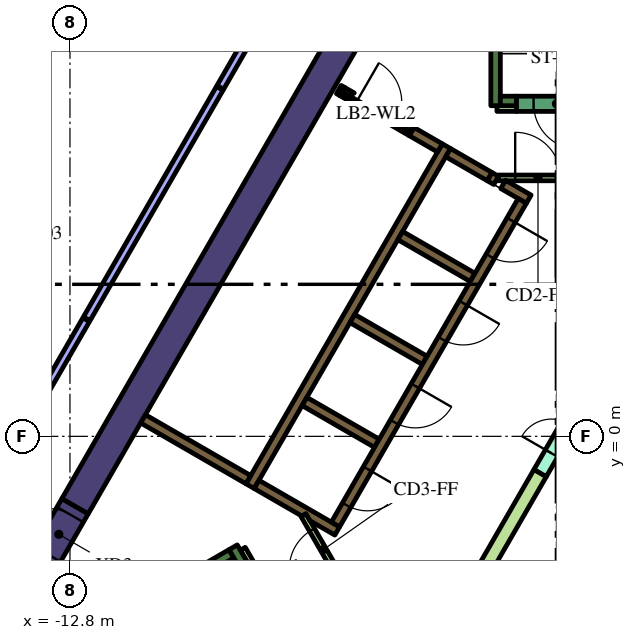
"""IFC4 building model, lengths in metres.
Left out: names, types, materials, properties, quantities, classifications, styles, units other than length and angle.
Written with IfcOpenShell. Run it as: python <this file> out.ifc"""

import sys

from ifc_helpers import new_model, si_unit, direction, frame, frame_2d, origin, place, context, subcontext, project, spatial, polyline, rectangle, outline, extrude, element, fill, save


model = new_model("IFC4")
c1 = context("Model", 3, precision=1e-05, world=origin(), true_north=direction((0.0, 1.0)))
c2 = subcontext(c1, "Body", "Model", "MODEL_VIEW")
j1 = project(units=[si_unit("LENGTHUNIT", "METRE"), si_unit("PLANEANGLEUNIT", "RADIAN")], contexts=[c1])
p1 = place(None, origin())
s1 = spatial("IfcSite", under=j1, at=p1, CompositionType="ELEMENT")
p2 = place(p1, origin())
s2 = spatial("IfcBuilding", under=s1, at=p2, CompositionType="ELEMENT")
p3 = place(p2, frame((0.0, 0.0, 183.6)))
s3 = spatial("IfcBuildingStorey", under=s2, at=p3, CompositionType="ELEMENT", Elevation=183.6)
p4 = place(p3, frame((-13.518, -3.314, 0.0), z_axis=(0.0, 0.0, 1.0), x_axis=(-0.499969377405, -0.866043083026, 0.0)))
e1 = element("IfcWall", 1, at=p4, inside=s3, PredefinedType="SOLIDWALL", context=c2, shape_type="SweptSolid", body=[
    extrude(rectangle(XDim=2.824, YDim=0.8, at=frame_2d((1.412, 0.0))), origin(), (0.0, 0.0, 1.0), 4.2),
])
p5 = place(p3, frame((-12.668, -1.842, 0.0), z_axis=(0.0, 0.0, 1.0), x_axis=(0.500003640647, 0.866023301845, 0.0)))
e2 = element("IfcWall", 2, at=p5, inside=s3, PredefinedType="SOLIDWALL", context=c2, shape_type="SweptSolid", body=[
    extrude(rectangle(XDim=15.858, YDim=0.8, at=frame_2d((7.929, 0.0))), origin(), (0.0, 0.0, 1.0), 4.2),
])
p6 = place(p3, frame((-1.6, 8.7, 0.0), z_axis=(0.0, 0.0, 1.0), x_axis=(0.0, 1.0, 0.0)))
e3 = element("IfcWall", 3, at=p6, inside=s3, PredefinedType="SOLIDWALL", context=c2, shape_type="SweptSolid", body=[
    extrude(rectangle(XDim=7.05, YDim=0.25, at=frame_2d((3.525, 0.0))), origin(), (0.0, 0.0, 1.0), 4.2),
])
p7 = place(p3, frame((-1.475, 8.825, 0.0), z_axis=(0.0, 0.0, 1.0), x_axis=(1.0, 0.0, 0.0)))
e4 = element("IfcWall", 4, at=p7, inside=s3, PredefinedType="SOLIDWALL", context=c2, shape_type="SweptSolid", body=[
    extrude(rectangle(XDim=0.425, YDim=0.25, at=frame_2d((0.212, 0.0))), origin(), (0.0, 0.0, 1.0), 4.2),
])
p8 = place(p3, frame((-14.44, -6.49, 0.0), z_axis=(0.0, 0.0, 1.0), x_axis=(0.866022966069, 0.500004222222, 0.0)))
e5 = element("IfcWall", 5, at=p8, inside=s3, PredefinedType="SOLIDWALL", context=c2, shape_type="SweptSolid", body=[
    extrude(rectangle(XDim=6.8, YDim=0.25, at=frame_2d((3.4, 0.0))), origin(), (0.0, 0.0, 1.0), 4.2),
])
p9 = place(p3, frame((-8.168, -3.503, 0.0), z_axis=(0.0, 0.0, 1.0), x_axis=(-0.499952099219, 0.866053057547, 0.0)))
e6 = element("IfcWall", 6, at=p9, inside=s3, PredefinedType="SOLIDWALL", context=c2, shape_type="SweptSolid", body=[
    extrude(rectangle(XDim=0.675, YDim=0.25, at=frame_2d((0.337, 0.0))), origin(), (0.0, 0.0, 1.0), 4.2),
])
p10 = place(p3, frame((-8.06, -1.311, 0.0), z_axis=(0.0, 0.0, 1.0), x_axis=(0.50000273126, 0.866023826885, 0.0)))
e7 = element("IfcWall", 7, at=p10, inside=s3, PredefinedType="SOLIDWALL", context=c2, shape_type="SweptSolid", body=[
    extrude(rectangle(XDim=10.33, YDim=0.25, at=frame_2d((5.165, 0.0))), origin(), (0.0, 0.0, 1.0), 4.2),
])
p11 = place(p3, frame((-1.758, 6.835, 0.0), z_axis=(0.0, 0.0, 1.0), x_axis=(0.865982457891, -0.500074377092, 0.0)))
e8 = element("IfcWall", 8, at=p11, inside=s3, PredefinedType="SOLIDWALL", context=c2, shape_type="SweptSolid", body=[
    extrude(rectangle(XDim=0.2, YDim=0.25, at=frame_2d((0.1, 0.0))), origin(), (0.0, 0.0, 1.0), 4.2),
])
p12 = place(p3, frame((-1.76, 6.836, 0.0), z_axis=(0.0, 0.0, 1.0), x_axis=(-0.865952863304, 0.500125622755, 0.0)))
e9 = element("IfcWall", 9, at=p12, inside=s3, PredefinedType="SOLIDWALL", context=c2, shape_type="SweptSolid", body=[
    extrude(rectangle(XDim=1.258, YDim=0.25, at=frame_2d((0.629, 0.0))), origin(), (0.0, 0.0, 1.0), 4.2),
])
p13 = place(p3, frame((-0.728, 6.24, 0.0), z_axis=(0.0, 0.0, 1.0), x_axis=(-0.865955664968, 0.500120771724, 0.0)))
e10 = element("IfcWall", 10, at=p13, inside=s3, PredefinedType="SOLIDWALL", context=c2, shape_type="SweptSolid", body=[
    extrude(rectangle(XDim=0.778, YDim=0.25, at=frame_2d((0.389, 0.0))), origin(), (0.0, 0.0, 1.0), 4.2),
])
for number, where, z_axis, x_axis in (
    (11, (-2.204, 4.182, 0.0), (0.0, 0.0, 1.0), (-0.866, 0.5, 0.0)),
    (12, (-5.369, 3.1, 0.0), (0.0, 0.0, 1.0), (0.866, -0.5, 0.0)),
    (13, (-4.724, -0.182, 0.0), (0.0, 0.0, 1.0), (-0.866, 0.5, 0.0)),
):
    element("IfcWall", number, at=place(p3, frame(where, z_axis=z_axis, x_axis=x_axis)), inside=s3, PredefinedType="SOLIDWALL", context=c2, shape_type="SweptSolid", body=[
        extrude(rectangle(XDim=2.2, YDim=0.25, at=frame_2d((1.1, 0.0))), origin(), (0.0, 0.0, 1.0), 4.2),
    ])
p14 = place(p3, origin())
e14 = element("IfcWall", 14, at=p14, inside=s3, PredefinedType="SOLIDWALL", context=c2, shape_type="SweptSolid", body=[
    extrude(outline(polyline([(-5.922, -2.257), (-5.922, -2.257), (-5.705, -2.382), (-5.83, -2.598), (-6.483, -2.221), (-6.591, -2.033), (-6.591, -2.033), (-6.7, -2.096), (-7.952, -1.373), (-7.827, -1.156), (-5.922, -2.257)])), origin(), (0.0, 0.0, 1.0), 4.2),
])
p15 = place(p3, frame((-8.106, -1.14, 0.0), z_axis=(0.0, 0.0, 1.0), x_axis=(-0.866008981251, 0.500028443584, 0.0)))
e15 = element("IfcWall", 15, at=p15, inside=s3, PredefinedType="SOLIDWALL", context=c2, shape_type="SweptSolid", body=[
    extrude(rectangle(XDim=3.2, YDim=0.25, at=frame_2d((1.6, 0.0))), origin(), (0.0, 0.0, 1.0), 4.2),
])
p16 = place(p3, frame((-5.725, 9.125, 0.0), z_axis=(0.0, 0.0, 1.0), x_axis=(0.866185586049, -0.49972245349, 0.0)))
e16 = element("IfcWall", 16, at=p16, inside=s3, PredefinedType="SOLIDWALL", context=c2, shape_type="SweptSolid", body=[
    extrude(rectangle(XDim=0.11, YDim=0.25, at=frame_2d((0.055, 0.0))), origin(), (0.0, 0.0, 1.0), 4.2),
])
p17 = place(p3, frame((-3.066, 7.59, 0.0), z_axis=(0.0, 0.0, 1.0), x_axis=(-0.866081358704, 0.49990307071, 0.0)))
e17 = element("IfcWall", 17, at=p17, inside=s3, PredefinedType="SOLIDWALL", context=c2, shape_type="SweptSolid", body=[
    extrude(rectangle(XDim=0.858, YDim=0.25, at=frame_2d((0.429, 0.0))), origin(), (0.0, 0.0, 1.0), 4.2),
])
e18 = element("IfcWall", 18, at=p14, inside=s3, PredefinedType="SOLIDWALL", context=c2, shape_type="SweptSolid", body=[
    extrude(outline(polyline([(-3.748, 8.128), (-3.813, 8.015), (-4.027, 8.139), (-4.017, 8.156), (-4.008, 8.173), (-4.0, 8.192), (-3.995, 8.21), (-3.991, 8.23), (-3.99, 8.25), (-3.99, 8.268), (-3.748, 8.128)])), origin(), (0.0, 0.0, 1.0), 4.2),
])
e19 = element("IfcWall", 19, at=p14, inside=s3, PredefinedType="SOLIDWALL", context=c2, shape_type="SweptSolid", body=[
    extrude(outline(polyline([(-5.689, 8.96), (-5.69, 8.961), (-5.565, 9.177), (-5.319, 9.035), (-5.335, 9.026), (-5.351, 9.015), (-5.366, 9.002), (-5.379, 8.988), (-5.392, 8.972), (-5.402, 8.956), (-5.412, 8.939), (-5.629, 9.064), (-5.629, 9.064), (-5.689, 8.96)])), origin(), (0.0, 0.0, 1.0), 4.2),
])
for number, where, z_axis, x_axis in (
    (20, (-8.252, -2.958, 0.0), (0.0, 0.0, 1.0), (0.5, -0.866, 0.0)),
    (21, (-1.564, 8.625, 0.0), (0.0, 0.0, 1.0), (1.0, 0.0, 0.0)),
):
    element("IfcWall", number, at=place(p3, frame(where, z_axis=z_axis, x_axis=x_axis)), inside=s3, PredefinedType="PARTITIONING", context=c2, shape_type="SweptSolid", body=[
        extrude(rectangle(XDim=0.514, YDim=0.15, at=frame_2d((0.257, 0.0))), origin(), (0.0, 0.0, 1.0), 3.15),
    ])
e22 = element("IfcWall", 22, at=p14, inside=s3, PredefinedType="PARTITIONING", context=c2, shape_type="SweptSolid", body=[
    extrude(outline(polyline([(-0.59, -0.872), (-0.265, -1.059), (-1.822, -3.756), (-2.147, -3.568), (-0.59, -0.872)])), origin(), (0.0, 0.0, 1.0), 3.15),
])
p18 = place(p3, frame((-0.898, 6.194, 0.0), z_axis=(0.0, 0.0, 1.0), x_axis=(-0.499996202215, -0.866027596426, 0.0)))
e23 = element("IfcWall", 23, at=p18, inside=s3, PredefinedType="SOLIDWALL", context=c2, shape_type="SweptSolid", body=[
    extrude(rectangle(XDim=9.83, YDim=0.25, at=frame_2d((4.915, 0.0))), origin(), (0.0, 0.0, 1.0), 4.2),
])
p19 = place(p18, frame((0.585, 0.0, 0.0)))
e24 = element("IfcOpeningElement", 24, at=p19, cuts=e23, PredefinedType="OPENING", context=c2, shape_type="SweptSolid", body=[
    extrude(rectangle(XDim=1.1, YDim=2.1, at=frame_2d((0.55, 1.05))), frame((0.0, 0.135, 0.0), z_axis=(0.0, -1.0, 0.0), x_axis=(1.0, 0.0, 0.0)), (0.0, 0.0, 1.0), 0.27),
])
p20 = place(p18, frame((3.105, 0.0, 0.0)))
e25 = element("IfcOpeningElement", 25, at=p20, cuts=e23, PredefinedType="OPENING", context=c2, shape_type="SweptSolid", body=[
    extrude(rectangle(XDim=1.1, YDim=2.1, at=frame_2d((0.55, 1.05))), frame((0.0, 0.135, 0.0), z_axis=(0.0, -1.0, 0.0), x_axis=(1.0, 0.0, 0.0)), (0.0, 0.0, 1.0), 0.27),
])
p21 = place(p18, frame((5.625, 0.0, 0.0)))
e26 = element("IfcOpeningElement", 26, at=p21, cuts=e23, PredefinedType="OPENING", context=c2, shape_type="SweptSolid", body=[
    extrude(rectangle(XDim=1.1, YDim=2.1, at=frame_2d((0.55, 1.05))), frame((0.0, 0.135, 0.0), z_axis=(0.0, -1.0, 0.0), x_axis=(1.0, 0.0, 0.0)), (0.0, 0.0, 1.0), 0.27),
])
p22 = place(p18, frame((8.145, 0.0, 0.0)))
e27 = element("IfcOpeningElement", 27, at=p22, cuts=e23, PredefinedType="OPENING", context=c2, shape_type="SweptSolid", body=[
    extrude(rectangle(XDim=1.1, YDim=2.1, at=frame_2d((0.55, 1.05))), frame((0.0, 0.135, 0.0), z_axis=(0.0, -1.0, 0.0), x_axis=(1.0, 0.0, 0.0)), (0.0, 0.0, 1.0), 0.27),
])
p23 = place(p3, frame((1.05, 8.75, 0.0), z_axis=(0.0, 0.0, 1.0), x_axis=(-1.0, 0.0, 0.0)))
e28 = element("IfcWall", 28, at=p23, inside=s3, PredefinedType="SOLIDWALL", context=c2, shape_type="SweptSolid", body=[
    extrude(rectangle(XDim=2.1, YDim=0.4, at=frame_2d((1.05, 0.0))), origin(), (0.0, 0.0, 1.0), 4.2),
])
p24 = place(p23, frame((0.45, 0.0, 0.0)))
e29 = element("IfcOpeningElement", 29, at=p24, cuts=e28, PredefinedType="OPENING", context=c2, shape_type="SweptSolid", body=[
    extrude(rectangle(XDim=1.2, YDim=2.1, at=frame_2d((0.6, 1.05))), frame((0.0, 0.21, 0.0), z_axis=(0.0, -1.0, 0.0), x_axis=(1.0, 0.0, 0.0)), (0.0, 0.0, 1.0), 0.42),
])
p25 = place(p3, frame((-0.427, -0.966, 0.0), z_axis=(0.0, 0.0, 1.0), x_axis=(0.49994051562, 0.866059744384, 0.0)))
e30 = element("IfcWall", 30, at=p25, inside=s3, PredefinedType="PARTITIONING", context=c2, shape_type="SweptSolid", body=[
    extrude(rectangle(XDim=2.1, YDim=0.375, at=frame_2d((1.05, 0.0))), origin(), (0.0, 0.0, 1.0), 3.15),
])
p26 = place(p25, frame((0.6, 0.0, 0.0)))
e31 = element("IfcOpeningElement", 31, at=p26, cuts=e30, PredefinedType="OPENING", context=c2, shape_type="SweptSolid", body=[
    extrude(rectangle(XDim=0.9, YDim=2.1, at=frame_2d((0.45, 1.05))), frame((0.0, 0.198, 0.0), z_axis=(0.0, -1.0, 0.0), x_axis=(1.0, 0.0, 0.0)), (0.0, 0.0, 1.0), 0.395),
])
p27 = place(p3, frame((-1.534, 6.8, 0.0), z_axis=(0.0, 0.0, 1.0), x_axis=(1.0, 0.0, 0.0)))
e32 = element("IfcWall", 32, at=p27, inside=s3, PredefinedType="PARTITIONING", context=c2, shape_type="SweptSolid", body=[
    extrude(rectangle(XDim=2.1, YDim=0.15, at=frame_2d((1.05, 0.0))), origin(), (0.0, 0.0, 1.0), 3.15),
])
p28 = place(p27, frame((0.45, 0.0, 0.0)))
e33 = element("IfcOpeningElement", 33, at=p28, cuts=e32, PredefinedType="OPENING", context=c2, shape_type="SweptSolid", body=[
    extrude(rectangle(XDim=1.2, YDim=2.1, at=frame_2d((0.6, 1.05))), frame((0.0, 0.085, 0.0), z_axis=(0.0, -1.0, 0.0), x_axis=(1.0, 0.0, 0.0)), (0.0, 0.0, 1.0), 0.17),
])
p29 = place(p3, frame((-5.606, -3.89, 0.0), z_axis=(0.0, 0.0, 1.0), x_axis=(-0.500027713859, 0.866009402589, 0.0)))
e34 = element("IfcWall", 34, at=p29, inside=s3, PredefinedType="PARTITIONING", context=c2, shape_type="SweptSolid", body=[
    extrude(rectangle(XDim=2.1, YDim=0.15, at=frame_2d((1.05, 0.0))), origin(), (0.0, 0.0, 1.0), 3.15),
])
p30 = place(p29, frame((0.45, 0.0, 0.0)))
e35 = element("IfcOpeningElement", 35, at=p30, cuts=e34, PredefinedType="OPENING", context=c2, shape_type="SweptSolid", body=[
    extrude(rectangle(XDim=1.2, YDim=2.1, at=frame_2d((0.6, 1.05))), frame((0.0, 0.085, 0.0), z_axis=(0.0, -1.0, 0.0), x_axis=(1.0, 0.0, 0.0)), (0.0, 0.0, 1.0), 0.17),
])
p31 = place(p3, frame((-5.659, 9.012, 0.0), z_axis=(0.0, 0.0, 1.0), x_axis=(0.866009402589, -0.500027713859, 0.0)))
e36 = element("IfcWall", 36, at=p31, inside=s3, PredefinedType="PARTITIONING", context=c2, shape_type="SweptSolid", body=[
    extrude(rectangle(XDim=2.1, YDim=0.12, at=frame_2d((1.05, 0.0))), origin(), (0.0, 0.0, 1.0), 3.15),
])
p32 = place(p31, frame((0.45, 0.0, 0.0)))
e37 = element("IfcOpeningElement", 37, at=p32, cuts=e36, PredefinedType="OPENING", context=c2, shape_type="SweptSolid", body=[
    extrude(rectangle(XDim=1.2, YDim=2.1, at=frame_2d((0.6, 1.05))), frame((0.0, 0.07, 0.0), z_axis=(0.0, -1.0, 0.0), x_axis=(1.0, 0.0, 0.0)), (0.0, 0.0, 1.0), 0.14),
])
p33 = place(p3, frame((-13.518, -3.314, 0.0), z_axis=(0.0, 0.0, 1.0), x_axis=(0.500000056704, 0.866025371046, 0.0)))
e38 = element("IfcWall", 38, at=p33, inside=s3, PredefinedType="SOLIDWALL", context=c2, shape_type="SweptSolid", body=[
    extrude(rectangle(XDim=1.7, YDim=0.8, at=frame_2d((0.85, 0.0))), origin(), (0.0, 0.0, 1.0), 4.2),
])
p34 = place(p33, frame((0.25, 0.0, 0.0)))
e39 = element("IfcOpeningElement", 39, at=p34, cuts=e38, PredefinedType="OPENING", context=c2, shape_type="SweptSolid", body=[
    extrude(rectangle(XDim=1.2, YDim=2.1, at=frame_2d((0.6, 1.05))), frame((0.0, 0.41, 0.0), z_axis=(0.0, -1.0, 0.0), x_axis=(1.0, 0.0, 0.0)), (0.0, 0.0, 1.0), 0.82),
])
p35 = place(p3, frame((-8.859, 9.156, 0.0), z_axis=(0.0, 0.0, 1.0), x_axis=(-0.500010275428, -0.866019471182, 0.0)))
e40 = element("IfcWall", 40, at=p35, inside=s3, PredefinedType="PARTITIONING", context=c2, shape_type="SweptSolid", body=[
    extrude(rectangle(XDim=7.0, YDim=0.2, at=frame_2d((3.5, 0.0))), origin(), (0.0, 0.0, 1.0), 3.15),
])
p36 = place(p3, frame((-12.374, 3.068, 0.0), z_axis=(0.0, 0.0, 1.0), x_axis=(-0.50000000053, -0.866025403479, 0.0)))
e41 = element("IfcWall", 41, at=p36, inside=s3, PredefinedType="PARTITIONING", context=c2, shape_type="SweptSolid", body=[
    extrude(rectangle(XDim=9.188, YDim=0.2, at=frame_2d((4.594, 0.0))), origin(), (0.0, 0.0, 1.0), 3.15),
])
p37 = place(p36, frame((4.1, 0.0, 0.0)))
e42 = element("IfcOpeningElement", 42, at=p37, cuts=e41, PredefinedType="OPENING", context=c2, shape_type="SweptSolid", body=[
    extrude(rectangle(XDim=1.0, YDim=2.1, at=frame_2d((0.5, 1.05))), frame((0.0, 0.11, 0.0), z_axis=(0.0, -1.0, 0.0), x_axis=(1.0, 0.0, 0.0)), (0.0, 0.0, 1.0), 0.22),
])
p38 = place(p3, frame((-7.453, 11.591, 0.0), z_axis=(0.0, 0.0, 1.0), x_axis=(-0.499980749935, -0.866036517529, 0.0)))
e43 = element("IfcWall", 43, at=p38, inside=s3, PredefinedType="PARTITIONING", context=c2, shape_type="SweptSolid", body=[
    extrude(rectangle(XDim=2.782, YDim=0.2, at=frame_2d((1.391, 0.0))), origin(), (0.0, 0.0, 1.0), 3.15),
])
p39 = place(p19, origin())
e44 = element("IfcDoor", 44, at=p39, inside=s3, OperationType="DOUBLE_DOOR_SLIDING", PredefinedType="DOOR", context=c2, shape_type="SweptSolid", body=[
    extrude(rectangle(XDim=1.1, YDim=2.1, at=frame_2d((0.55, 1.05))), frame((0.0, 0.025, 0.0), z_axis=(0.0, -1.0, 0.0), x_axis=(1.0, 0.0, 0.0)), (0.0, 0.0, 1.0), 0.05),
])
fill(e24, e44)
p40 = place(p20, origin())
e45 = element("IfcDoor", 45, at=p40, inside=s3, OperationType="DOUBLE_DOOR_SLIDING", PredefinedType="DOOR", context=c2, shape_type="SweptSolid", body=[
    extrude(rectangle(XDim=1.1, YDim=2.1, at=frame_2d((0.55, 1.05))), frame((0.0, 0.025, 0.0), z_axis=(0.0, -1.0, 0.0), x_axis=(1.0, 0.0, 0.0)), (0.0, 0.0, 1.0), 0.05),
])
fill(e25, e45)
p41 = place(p21, origin())
e46 = element("IfcDoor", 46, at=p41, inside=s3, OperationType="DOUBLE_DOOR_SLIDING", PredefinedType="DOOR", context=c2, shape_type="SweptSolid", body=[
    extrude(rectangle(XDim=1.1, YDim=2.1, at=frame_2d((0.55, 1.05))), frame((0.0, 0.025, 0.0), z_axis=(0.0, -1.0, 0.0), x_axis=(1.0, 0.0, 0.0)), (0.0, 0.0, 1.0), 0.05),
])
fill(e26, e46)
p42 = place(p22, origin())
e47 = element("IfcDoor", 47, at=p42, inside=s3, OperationType="DOUBLE_DOOR_SLIDING", PredefinedType="DOOR", context=c2, shape_type="SweptSolid", body=[
    extrude(rectangle(XDim=1.1, YDim=2.1, at=frame_2d((0.55, 1.05))), frame((0.0, 0.025, 0.0), z_axis=(0.0, -1.0, 0.0), x_axis=(1.0, 0.0, 0.0)), (0.0, 0.0, 1.0), 0.05),
])
fill(e27, e47)
p43 = place(p24, origin())
e48 = element("IfcDoor", 48, at=p43, inside=s3, OperationType="SINGLE_SWING_LEFT", PredefinedType="DOOR", context=c2, shape_type="SweptSolid", body=[
    extrude(rectangle(XDim=1.2, YDim=2.1, at=frame_2d((0.6, 1.05))), frame((0.0, 0.025, 0.0), z_axis=(0.0, -1.0, 0.0), x_axis=(1.0, 0.0, 0.0)), (0.0, 0.0, 1.0), 0.05),
])
fill(e29, e48)
p44 = place(p26, origin())
e49 = element("IfcDoor", 49, at=p44, inside=s3, OperationType="SINGLE_SWING_LEFT", PredefinedType="DOOR", context=c2, shape_type="SweptSolid", body=[
    extrude(rectangle(XDim=0.9, YDim=2.1, at=frame_2d((0.45, 1.05))), frame((0.0, 0.025, 0.0), z_axis=(0.0, -1.0, 0.0), x_axis=(1.0, 0.0, 0.0)), (0.0, 0.0, 1.0), 0.05),
])
fill(e31, e49)
p45 = place(p28, origin())
e50 = element("IfcDoor", 50, at=p45, inside=s3, OperationType="SINGLE_SWING_LEFT", PredefinedType="DOOR", context=c2, shape_type="SweptSolid", body=[
    extrude(rectangle(XDim=1.2, YDim=2.1, at=frame_2d((0.6, 1.05))), frame((0.0, 0.025, 0.0), z_axis=(0.0, -1.0, 0.0), x_axis=(1.0, 0.0, 0.0)), (0.0, 0.0, 1.0), 0.05),
])
fill(e33, e50)
p46 = place(p30, origin())
e51 = element("IfcDoor", 51, at=p46, inside=s3, OperationType="SINGLE_SWING_LEFT", PredefinedType="DOOR", context=c2, shape_type="SweptSolid", body=[
    extrude(rectangle(XDim=1.2, YDim=2.1, at=frame_2d((0.6, 1.05))), frame((0.0, 0.025, 0.0), z_axis=(0.0, -1.0, 0.0), x_axis=(1.0, 0.0, 0.0)), (0.0, 0.0, 1.0), 0.05),
])
fill(e35, e51)
p47 = place(p32, origin())
e52 = element("IfcDoor", 52, at=p47, inside=s3, OperationType="SINGLE_SWING_LEFT", PredefinedType="DOOR", context=c2, shape_type="SweptSolid", body=[
    extrude(rectangle(XDim=1.2, YDim=2.1, at=frame_2d((0.6, 1.05))), frame((0.0, 0.025, 0.0), z_axis=(0.0, -1.0, 0.0), x_axis=(1.0, 0.0, 0.0)), (0.0, 0.0, 1.0), 0.05),
])
fill(e37, e52)
p48 = place(p34, origin())
e53 = element("IfcDoor", 53, at=p48, inside=s3, OperationType="SINGLE_SWING_LEFT", PredefinedType="DOOR", context=c2, shape_type="SweptSolid", body=[
    extrude(rectangle(XDim=1.2, YDim=2.1, at=frame_2d((0.6, 1.05))), frame((0.0, 0.025, 0.0), z_axis=(0.0, -1.0, 0.0), x_axis=(1.0, 0.0, 0.0)), (0.0, 0.0, 1.0), 0.05),
])
fill(e39, e53)
save(model, sys.argv[1])
